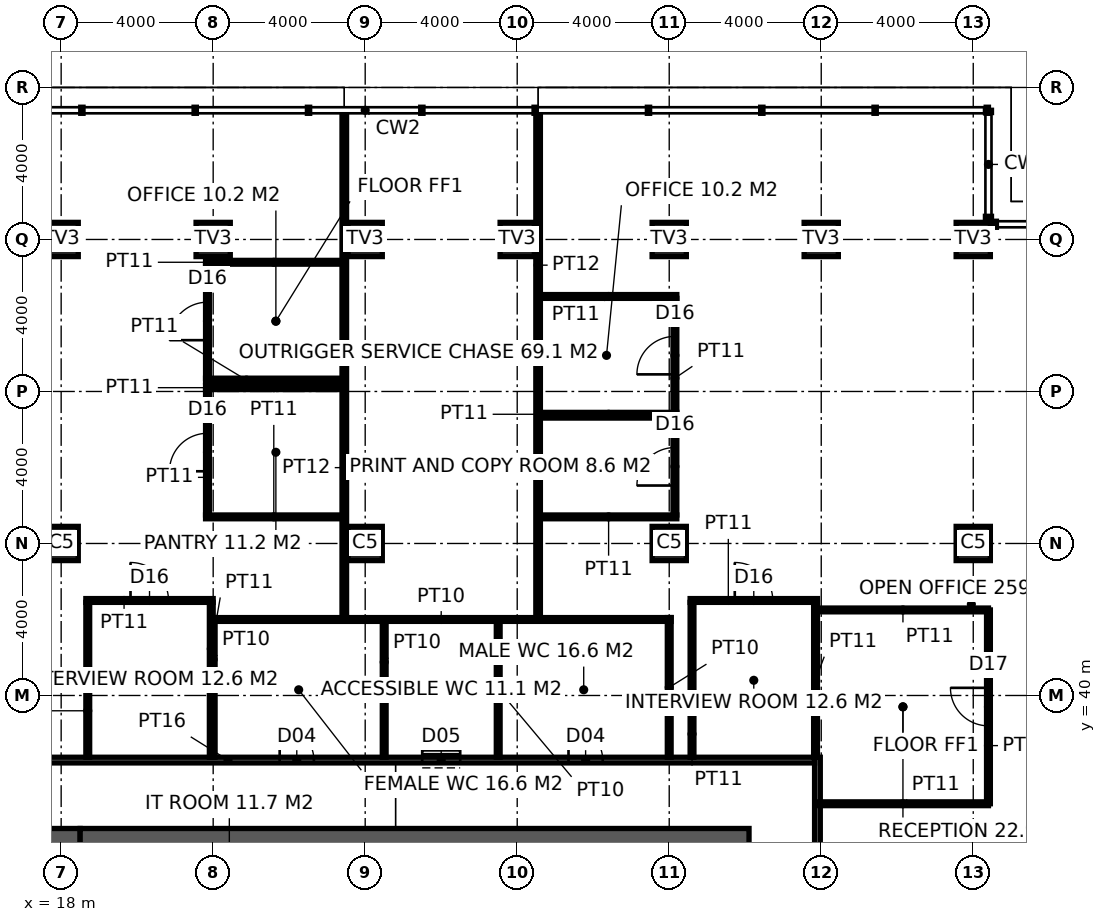
"""IFC4 building model, lengths in metres.
Left out: names, types, materials, properties, quantities, classifications, styles, units other than length and angle.
Written with IfcOpenShell. Run it as: python <this file> out.ifc"""

import sys

from ifc_helpers import new_model, si_unit, direction, frame, frame_2d, origin, origin_2d, place, context, subcontext, project, spatial, rectangle, hollow_rectangle, extrude, element, fill, save


model = new_model("IFC4")
c1 = context("Model", 3, precision=1e-05, world=origin(), true_north=direction((0.0, 1.0)))
c2 = subcontext(c1, "Body", "Model", "MODEL_VIEW")
j1 = project(units=[si_unit("LENGTHUNIT", "METRE"), si_unit("PLANEANGLEUNIT", "RADIAN")], contexts=[c1])
p1 = place(None, origin())
s1 = spatial("IfcSite", under=j1, at=p1, CompositionType="ELEMENT")
p2 = place(p1, origin())
s2 = spatial("IfcBuilding", under=s1, at=p2, CompositionType="ELEMENT")
p3 = place(p2, frame((0.0, 0.0, 171.8)))
s3 = spatial("IfcBuildingStorey", under=s2, at=p3, CompositionType="ELEMENT", Elevation=171.8)
for number, where, z_axis, x_axis in (
    (1, (18.0, 52.0, 0.0), (0.0, 0.0, 1.0), (1.0, 0.0, 0.0)),
    (2, (22.0, 52.0, 0.0), (0.0, 0.0, 1.0), (1.0, 0.0, 0.0)),
    (3, (26.0, 52.0, 0.0), (0.0, 0.0, 1.0), (1.0, 0.0, 0.0)),
    (4, (30.0, 52.0, 0.0), (0.0, 0.0, 1.0), (1.0, 0.0, 0.0)),
    (5, (34.0, 52.0, 0.0), (0.0, 0.0, 1.0), (1.0, 0.0, 0.0)),
    (6, (38.0, 52.0, 0.0), (0.0, 0.0, 1.0), (1.0, 0.0, 0.0)),
    (7, (42.0, 52.0, 0.0), (0.0, 0.0, 1.0), (1.0, 0.0, 0.0)),
):
    element("IfcColumn", number, at=place(p3, frame(where, z_axis=z_axis, x_axis=x_axis)), inside=s3, PredefinedType="USERDEFINED", context=c2, shape_type="SweptSolid", body=[
        extrude(hollow_rectangle(XDim=0.9, YDim=0.9, WallThickness=0.08, at=origin_2d()), origin(), (0.0, 0.0, 1.0), 4.0),
    ])
for number, where, z_axis, x_axis in (
    (8, (18.0, 44.0, 0.0), (0.0, 0.0, 1.0), (1.0, 0.0, 0.0)),
    (9, (26.0, 44.0, 0.0), (0.0, 0.0, 1.0), (1.0, 0.0, 0.0)),
    (10, (34.0, 44.0, 0.0), (0.0, 0.0, 1.0), (1.0, 0.0, 0.0)),
    (11, (42.0, 44.0, 0.0), (0.0, 0.0, 1.0), (1.0, 0.0, 0.0)),
):
    element("IfcColumn", number, at=place(p3, frame(where, z_axis=z_axis, x_axis=x_axis)), inside=s3, PredefinedType="COLUMN", context=c2, shape_type="SweptSolid", body=[
        extrude(hollow_rectangle(XDim=0.9, YDim=0.9, WallThickness=0.1, at=origin_2d()), origin(), (0.0, 0.0, 1.0), 4.0),
    ])
p4 = place(p3, frame((18.0, 17.5, -0.15), z_axis=(0.0, 0.0, 1.0), x_axis=(0.0, 1.0, 0.0)))
e12 = element("IfcWall", 12, at=p4, inside=s3, PredefinedType="SHEAR", context=c2, shape_type="SweptSolid", body=[
    extrude(rectangle(XDim=19.0, YDim=1.0, at=frame_2d((9.5, 0.0))), origin(), (0.0, 0.0, 1.0), 4.0),
])
p5 = place(p3, frame((18.5, 36.0, -0.15), z_axis=(0.0, 0.0, 1.0), x_axis=(1.0, 0.0, 0.0)))
e13 = element("IfcWall", 13, at=p5, inside=s3, PredefinedType="SHEAR", context=c2, shape_type="SweptSolid", body=[
    extrude(rectangle(XDim=17.6, YDim=1.0, at=frame_2d((8.8, 0.0))), origin(), (0.0, 0.0, 1.0), 4.0),
])
p6 = place(p3, frame((37.9, 15.625, 0.0), z_axis=(0.0, 0.0, 1.0), x_axis=(0.0, 1.0, 0.0)))
e14 = element("IfcWall", 14, at=p6, inside=s3, PredefinedType="PARTITIONING", context=c2, shape_type="SweptSolid", body=[
    extrude(rectangle(XDim=22.75, YDim=0.15, at=frame_2d((11.375, 0.0))), origin(), (0.0, 0.0, 1.0), 2.65),
])
p7 = place(p6, frame((3.074, 0.0, 0.0)))
e15 = element("IfcOpeningElement", 15, at=p7, cuts=e14, PredefinedType="OPENING", context=c2, shape_type="SweptSolid", body=[
    extrude(rectangle(XDim=1.8, YDim=2.4, at=frame_2d((0.9, 1.2))), frame((0.0, 0.085, 0.0), z_axis=(0.0, -1.0, 0.0), x_axis=(1.0, 0.0, 0.0)), (0.0, 0.0, 1.0), 0.17),
])
p8 = place(p6, frame((16.876, 0.0, 0.0)))
e16 = element("IfcOpeningElement", 16, at=p8, cuts=e14, PredefinedType="OPENING", context=c2, shape_type="SweptSolid", body=[
    extrude(rectangle(XDim=1.8, YDim=2.4, at=frame_2d((0.9, 1.2))), frame((0.0, 0.085, 0.0), z_axis=(0.0, -1.0, 0.0), x_axis=(1.0, 0.0, 0.0)), (0.0, 0.0, 1.0), 0.17),
])
p9 = place(p6, frame((9.875, 0.0, 0.0)))
e17 = element("IfcOpeningElement", 17, at=p9, cuts=e14, PredefinedType="OPENING", context=c2, shape_type="SweptSolid", body=[
    extrude(rectangle(XDim=1.0, YDim=2.2, at=frame_2d((0.5, 1.1))), frame((0.0, 0.085, 0.0), z_axis=(0.0, -1.0, 0.0), x_axis=(1.0, 0.0, 0.0)), (0.0, 0.0, 1.0), 0.17),
])
p10 = place(p3, frame((15.775, 38.3, 0.0), z_axis=(0.0, 0.0, 1.0), x_axis=(1.0, 0.0, 0.0)))
e18 = element("IfcWall", 18, at=p10, inside=s3, PredefinedType="PARTITIONING", context=c2, shape_type="SweptSolid", body=[
    extrude(rectangle(XDim=22.05, YDim=0.15, at=frame_2d((11.025, 0.0))), origin(), (0.0, 0.0, 1.0), 3.85),
])
p11 = place(p10, frame((7.975, 0.0, 0.0)))
e19 = element("IfcOpeningElement", 19, at=p11, cuts=e18, PredefinedType="OPENING", context=c2, shape_type="SweptSolid", body=[
    extrude(rectangle(XDim=0.9, YDim=2.1, at=frame_2d((0.45, 1.05))), frame((0.0, 0.085, 0.0), z_axis=(0.0, -1.0, 0.0), x_axis=(1.0, 0.0, 0.0)), (0.0, 0.0, 1.0), 0.17),
])
p12 = place(p10, frame((11.725, 0.0, 0.0)))
e20 = element("IfcOpeningElement", 20, at=p12, cuts=e18, PredefinedType="OPENING", context=c2, shape_type="SweptSolid", body=[
    extrude(rectangle(XDim=1.0, YDim=2.1, at=frame_2d((0.5, 1.05))), frame((0.0, 0.085, 0.0), z_axis=(0.0, -1.0, 0.0), x_axis=(1.0, 0.0, 0.0)), (0.0, 0.0, 1.0), 0.17),
])
p13 = place(p10, frame((15.575, 0.0, 0.0)))
e21 = element("IfcOpeningElement", 21, at=p13, cuts=e18, PredefinedType="OPENING", context=c2, shape_type="SweptSolid", body=[
    extrude(rectangle(XDim=0.9, YDim=2.1, at=frame_2d((0.45, 1.05))), frame((0.0, 0.085, 0.0), z_axis=(0.0, -1.0, 0.0), x_axis=(1.0, 0.0, 0.0)), (0.0, 0.0, 1.0), 0.17),
])
for number, where, z_axis, x_axis in (
    (22, (22.0, 38.375, 0.0), (0.0, 0.0, 1.0), (0.0, 1.0, 0.0)),
    (23, (34.0, 38.375, 0.0), (0.0, 0.0, 1.0), (0.0, 1.0, 0.0)),
):
    element("IfcWall", number, at=place(p3, frame(where, z_axis=z_axis, x_axis=x_axis)), inside=s3, PredefinedType="PARTITIONING", context=c2, shape_type="SweptSolid", body=[
        extrude(rectangle(XDim=3.675, YDim=0.1, at=frame_2d((1.837, 0.0))), origin(), (0.0, 0.0, 1.0), 2.95),
    ])
p14 = place(p3, frame((21.95, 42.0, 0.0), z_axis=(0.0, 0.0, 1.0), x_axis=(1.0, 0.0, 0.0)))
e24 = element("IfcWall", 24, at=p14, inside=s3, PredefinedType="PARTITIONING", context=c2, shape_type="SweptSolid", body=[
    extrude(rectangle(XDim=12.1, YDim=0.1, at=frame_2d((6.05, 0.0))), origin(), (0.0, 0.0, 1.0), 3.85),
])
for number, where, z_axis, x_axis in (
    (25, (26.5, 38.375, 0.0), (0.0, 0.0, 1.0), (0.0, 1.0, 0.0)),
    (26, (29.5, 38.375, 0.0), (0.0, 0.0, 1.0), (0.0, 1.0, 0.0)),
):
    element("IfcWall", number, at=place(p3, frame(where, z_axis=z_axis, x_axis=x_axis)), inside=s3, PredefinedType="PARTITIONING", context=c2, shape_type="SweptSolid", body=[
        extrude(rectangle(XDim=3.575, YDim=0.1, at=frame_2d((1.788, 0.0))), origin(), (0.0, 0.0, 1.0), 3.85),
    ])
for number, where, z_axis, x_axis in (
    (27, (25.45, 42.0, 0.0), (0.0, 0.0, 1.0), (0.0, 1.0, 0.0)),
    (28, (30.55, 42.0, 0.0), (0.0, 0.0, 1.0), (0.0, 1.0, 0.0)),
):
    element("IfcWall", number, at=place(p3, frame(where, z_axis=z_axis, x_axis=x_axis)), inside=s3, PredefinedType="PARTITIONING", context=c2, shape_type="SweptSolid", body=[
        extrude(rectangle(XDim=13.32, YDim=0.12, at=frame_2d((6.66, 0.0))), origin(), (0.0, 0.0, 1.0), 3.85),
    ])
p15 = place(p3, frame((18.65, 42.5, 0.0), z_axis=(0.0, 0.0, 1.0), x_axis=(1.0, 0.0, 0.0)))
e29 = element("IfcWall", 29, at=p15, inside=s3, PredefinedType="PARTITIONING", context=c2, shape_type="SweptSolid", body=[
    extrude(rectangle(XDim=3.35, YDim=0.1, at=frame_2d((1.675, 0.0))), origin(), (0.0, 0.0, 1.0), 3.85),
])
p16 = place(p15, frame((1.175, 0.0, 0.0)))
e30 = element("IfcOpeningElement", 30, at=p16, cuts=e29, PredefinedType="OPENING", context=c2, shape_type="SweptSolid", body=[
    extrude(rectangle(XDim=1.0, YDim=2.2, at=frame_2d((0.5, 1.1))), frame((0.0, 0.06, 0.0), z_axis=(0.0, -1.0, 0.0), x_axis=(1.0, 0.0, 0.0)), (0.0, 0.0, 1.0), 0.12),
])
p17 = place(p3, frame((34.55, 42.5, 0.0), z_axis=(0.0, 0.0, 1.0), x_axis=(1.0, 0.0, 0.0)))
e31 = element("IfcWall", 31, at=p17, inside=s3, PredefinedType="PARTITIONING", context=c2, shape_type="SweptSolid", body=[
    extrude(rectangle(XDim=3.35, YDim=0.1, at=frame_2d((1.675, 0.0))), origin(), (0.0, 0.0, 1.0), 3.85),
])
p18 = place(p17, frame((1.175, 0.0, 0.0)))
e32 = element("IfcOpeningElement", 32, at=p18, cuts=e31, PredefinedType="OPENING", context=c2, shape_type="SweptSolid", body=[
    extrude(rectangle(XDim=1.0, YDim=2.2, at=frame_2d((0.5, 1.1))), frame((0.0, 0.06, 0.0), z_axis=(0.0, -1.0, 0.0), x_axis=(1.0, 0.0, 0.0)), (0.0, 0.0, 1.0), 0.12),
])
for number, where, z_axis, x_axis in (
    (33, (21.8, 44.7, 0.0), (0.0, 0.0, 1.0), (1.0, 0.0, 0.0)),
    (34, (30.61, 44.7, 0.0), (0.0, 0.0, 1.0), (1.0, 0.0, 0.0)),
    (35, (30.61, 47.35, 0.0), (0.0, 0.0, 1.0), (1.0, 0.0, 0.0)),
    (36, (30.61, 47.4, 0.0), (0.0, 0.0, 1.0), (1.0, 0.0, 0.0)),
    (37, (21.8, 48.1, 0.0), (0.0, 0.0, 1.0), (1.0, 0.0, 0.0)),
    (38, (21.8, 48.3, 0.0), (0.0, 0.0, 1.0), (1.0, 0.0, 0.0)),
    (39, (30.61, 50.5, 0.0), (0.0, 0.0, 1.0), (1.0, 0.0, 0.0)),
    (40, (21.8, 51.4, 0.0), (0.0, 0.0, 1.0), (1.0, 0.0, 0.0)),
):
    element("IfcWall", number, at=place(p3, frame(where, z_axis=z_axis, x_axis=x_axis)), inside=s3, PredefinedType="PARTITIONING", context=c2, shape_type="SweptSolid", body=[
        extrude(rectangle(XDim=3.59, YDim=0.1, at=frame_2d((1.795, 0.0))), origin(), (0.0, 0.0, 1.0), 3.85),
    ])
p19 = place(p3, frame((18.7, 38.375, 0.0), z_axis=(0.0, 0.0, 1.0), x_axis=(0.0, 1.0, 0.0)))
e41 = element("IfcWall", 41, at=p19, inside=s3, PredefinedType="PARTITIONING", context=c2, shape_type="SweptSolid", body=[
    extrude(rectangle(XDim=4.075, YDim=0.1, at=frame_2d((2.038, 0.0))), origin(), (0.0, 0.0, 1.0), 3.85),
])
p20 = place(p3, frame((21.85, 44.75, 0.0), z_axis=(0.0, 0.0, 1.0), x_axis=(0.0, 1.0, 0.0)))
e42 = element("IfcWall", 42, at=p20, inside=s3, PredefinedType="PARTITIONING", context=c2, shape_type="SweptSolid", body=[
    extrude(rectangle(XDim=3.3, YDim=0.1, at=frame_2d((1.65, 0.0))), origin(), (0.0, 0.0, 1.0), 2.95),
])
p21 = place(p20, frame((1.15, 0.0, 0.0)))
e43 = element("IfcOpeningElement", 43, at=p21, cuts=e42, PredefinedType="OPENING", context=c2, shape_type="SweptSolid", body=[
    extrude(rectangle(XDim=1.0, YDim=2.2, at=frame_2d((0.5, 1.1))), frame((0.0, 0.06, 0.0), z_axis=(0.0, -1.0, 0.0), x_axis=(1.0, 0.0, 0.0)), (0.0, 0.0, 1.0), 0.12),
])
p22 = place(p3, frame((21.85, 48.35, 0.0), z_axis=(0.0, 0.0, 1.0), x_axis=(0.0, 1.0, 0.0)))
e44 = element("IfcWall", 44, at=p22, inside=s3, PredefinedType="PARTITIONING", context=c2, shape_type="SweptSolid", body=[
    extrude(rectangle(XDim=3.0, YDim=0.1, at=frame_2d((1.5, 0.0))), origin(), (0.0, 0.0, 1.0), 2.95),
])
p23 = place(p22, frame((1.0, 0.0, 0.0)))
e45 = element("IfcOpeningElement", 45, at=p23, cuts=e44, PredefinedType="OPENING", context=c2, shape_type="SweptSolid", body=[
    extrude(rectangle(XDim=1.0, YDim=2.2, at=frame_2d((0.5, 1.1))), frame((0.0, 0.06, 0.0), z_axis=(0.0, -1.0, 0.0), x_axis=(1.0, 0.0, 0.0)), (0.0, 0.0, 1.0), 0.12),
])
p24 = place(p3, frame((21.95, 38.375, 0.0), z_axis=(0.0, 0.0, 1.0), x_axis=(0.0, 1.0, 0.0)))
e46 = element("IfcWall", 46, at=p24, inside=s3, PredefinedType="PARTITIONING", context=c2, shape_type="SweptSolid", body=[
    extrude(rectangle(XDim=4.075, YDim=0.1, at=frame_2d((2.038, 0.0))), origin(), (0.0, 0.0, 1.0), 2.95),
])
p25 = place(p3, frame((34.15, 44.75, 0.0), z_axis=(0.0, 0.0, 1.0), x_axis=(0.0, 1.0, 0.0)))
e47 = element("IfcWall", 47, at=p25, inside=s3, PredefinedType="PARTITIONING", context=c2, shape_type="SweptSolid", body=[
    extrude(rectangle(XDim=2.55, YDim=0.1, at=frame_2d((1.275, 0.0))), origin(), (0.0, 0.0, 1.0), 2.95),
])
p26 = place(p25, frame((0.775, 0.0, 0.0)))
e48 = element("IfcOpeningElement", 48, at=p26, cuts=e47, PredefinedType="OPENING", context=c2, shape_type="SweptSolid", body=[
    extrude(rectangle(XDim=1.0, YDim=2.2, at=frame_2d((0.5, 1.1))), frame((0.0, 0.06, 0.0), z_axis=(0.0, -1.0, 0.0), x_axis=(1.0, 0.0, 0.0)), (0.0, 0.0, 1.0), 0.12),
])
p27 = place(p3, frame((34.15, 47.45, 0.0), z_axis=(0.0, 0.0, 1.0), x_axis=(0.0, 1.0, 0.0)))
e49 = element("IfcWall", 49, at=p27, inside=s3, PredefinedType="PARTITIONING", context=c2, shape_type="SweptSolid", body=[
    extrude(rectangle(XDim=3.0, YDim=0.1, at=frame_2d((1.5, 0.0))), origin(), (0.0, 0.0, 1.0), 2.95),
])
p28 = place(p27, frame((1.0, 0.0, 0.0)))
e50 = element("IfcOpeningElement", 50, at=p28, cuts=e49, PredefinedType="OPENING", context=c2, shape_type="SweptSolid", body=[
    extrude(rectangle(XDim=1.0, YDim=2.2, at=frame_2d((0.5, 1.1))), frame((0.0, 0.06, 0.0), z_axis=(0.0, -1.0, 0.0), x_axis=(1.0, 0.0, 0.0)), (0.0, 0.0, 1.0), 0.12),
])
p29 = place(p3, frame((34.6, 38.375, 0.0), z_axis=(0.0, 0.0, 1.0), x_axis=(0.0, 1.0, 0.0)))
e51 = element("IfcWall", 51, at=p29, inside=s3, PredefinedType="PARTITIONING", context=c2, shape_type="SweptSolid", body=[
    extrude(rectangle(XDim=4.075, YDim=0.1, at=frame_2d((2.038, 0.0))), origin(), (0.0, 0.0, 1.0), 3.85),
])
p30 = place(p3, frame((37.85, 38.375, 0.0), z_axis=(0.0, 0.0, 1.0), x_axis=(0.0, 1.0, 0.0)))
e52 = element("IfcWall", 52, at=p30, inside=s3, PredefinedType="PARTITIONING", context=c2, shape_type="SweptSolid", body=[
    extrude(rectangle(XDim=4.075, YDim=0.1, at=frame_2d((2.038, 0.0))), origin(), (0.0, 0.0, 1.0), 2.65),
])
p31 = place(p3, frame((37.9, 37.151, 0.0), z_axis=(0.0, 0.0, 1.0), x_axis=(1.0, 0.0, 0.0)))
e53 = element("IfcWall", 53, at=p31, inside=s3, PredefinedType="PARTITIONING", context=c2, shape_type="SweptSolid", body=[
    extrude(rectangle(XDim=4.5, YDim=0.1, at=frame_2d((2.25, 0.0))), origin(), (0.0, 0.0, 1.0), 3.85),
])
p32 = place(p3, frame((42.4, 37.151, 0.0), z_axis=(0.0, 0.0, 1.0), x_axis=(0.0, 1.0, 0.0)))
e54 = element("IfcWall", 54, at=p32, inside=s3, PredefinedType="PARTITIONING", context=c2, shape_type="SweptSolid", body=[
    extrude(rectangle(XDim=5.1, YDim=0.1, at=frame_2d((2.55, 0.0))), origin(), (0.0, 0.0, 1.0), 2.65),
])
p33 = place(p32, frame((2.05, 0.0, 0.0)))
e55 = element("IfcOpeningElement", 55, at=p33, cuts=e54, PredefinedType="OPENING", context=c2, shape_type="SweptSolid", body=[
    extrude(rectangle(XDim=1.0, YDim=2.2, at=frame_2d((0.5, 1.1))), frame((0.0, 0.06, 0.0), z_axis=(0.0, -1.0, 0.0), x_axis=(1.0, 0.0, 0.0)), (0.0, 0.0, 1.0), 0.12),
])
p34 = place(p3, frame((42.4, 42.251, 0.0), z_axis=(0.0, 0.0, 1.0), x_axis=(-1.0, 0.0, 0.0)))
e56 = element("IfcWall", 56, at=p34, inside=s3, PredefinedType="PARTITIONING", context=c2, shape_type="SweptSolid", body=[
    extrude(rectangle(XDim=4.5, YDim=0.1, at=frame_2d((2.25, 0.0))), origin(), (0.0, 0.0, 1.0), 3.85),
])
p35 = place(p11, origin())
e57 = element("IfcDoor", 57, at=p35, inside=s3, OperationType="SINGLE_SWING_LEFT", PredefinedType="DOOR", context=c2, shape_type="SweptSolid", body=[
    extrude(rectangle(XDim=0.9, YDim=2.1, at=frame_2d((0.45, 1.05))), frame((0.0, 0.025, 0.0), z_axis=(0.0, -1.0, 0.0), x_axis=(1.0, 0.0, 0.0)), (0.0, 0.0, 1.0), 0.05),
])
fill(e19, e57)
p36 = place(p12, origin())
e58 = element("IfcDoor", 58, at=p36, inside=s3, OperationType="SLIDING_TO_LEFT", PredefinedType="DOOR", context=c2, shape_type="SweptSolid", body=[
    extrude(rectangle(XDim=1.0, YDim=2.1, at=frame_2d((0.5, 1.05))), frame((0.0, 0.025, 0.0), z_axis=(0.0, -1.0, 0.0), x_axis=(1.0, 0.0, 0.0)), (0.0, 0.0, 1.0), 0.05),
])
fill(e20, e58)
p37 = place(p13, origin())
e59 = element("IfcDoor", 59, at=p37, inside=s3, OperationType="SINGLE_SWING_LEFT", PredefinedType="DOOR", context=c2, shape_type="SweptSolid", body=[
    extrude(rectangle(XDim=0.9, YDim=2.1, at=frame_2d((0.45, 1.05))), frame((0.0, 0.025, 0.0), z_axis=(0.0, -1.0, 0.0), x_axis=(1.0, 0.0, 0.0)), (0.0, 0.0, 1.0), 0.05),
])
fill(e21, e59)
p38 = place(p16, origin())
e60 = element("IfcDoor", 60, at=p38, inside=s3, OperationType="SINGLE_SWING_LEFT", PredefinedType="DOOR", context=c2, shape_type="SweptSolid", body=[
    extrude(rectangle(XDim=1.0, YDim=2.2, at=frame_2d((0.5, 1.1))), frame((0.0, 0.025, 0.0), z_axis=(0.0, -1.0, 0.0), x_axis=(1.0, 0.0, 0.0)), (0.0, 0.0, 1.0), 0.05),
])
fill(e30, e60)
p39 = place(p21, origin())
e61 = element("IfcDoor", 61, at=p39, inside=s3, OperationType="SINGLE_SWING_LEFT", PredefinedType="DOOR", context=c2, shape_type="SweptSolid", body=[
    extrude(rectangle(XDim=1.0, YDim=2.2, at=frame_2d((0.5, 1.1))), frame((0.0, 0.025, 0.0), z_axis=(0.0, -1.0, 0.0), x_axis=(1.0, 0.0, 0.0)), (0.0, 0.0, 1.0), 0.05),
])
fill(e43, e61)
p40 = place(p23, origin())
e62 = element("IfcDoor", 62, at=p40, inside=s3, OperationType="SINGLE_SWING_LEFT", PredefinedType="DOOR", context=c2, shape_type="SweptSolid", body=[
    extrude(rectangle(XDim=1.0, YDim=2.2, at=frame_2d((0.5, 1.1))), frame((0.0, 0.025, 0.0), z_axis=(0.0, -1.0, 0.0), x_axis=(1.0, 0.0, 0.0)), (0.0, 0.0, 1.0), 0.05),
])
fill(e45, e62)
p41 = place(p18, origin())
e63 = element("IfcDoor", 63, at=p41, inside=s3, OperationType="SINGLE_SWING_LEFT", PredefinedType="DOOR", context=c2, shape_type="SweptSolid", body=[
    extrude(rectangle(XDim=1.0, YDim=2.2, at=frame_2d((0.5, 1.1))), frame((0.0, 0.025, 0.0), z_axis=(0.0, -1.0, 0.0), x_axis=(1.0, 0.0, 0.0)), (0.0, 0.0, 1.0), 0.05),
])
fill(e32, e63)
p42 = place(p26, origin())
e64 = element("IfcDoor", 64, at=p42, inside=s3, OperationType="SINGLE_SWING_LEFT", PredefinedType="DOOR", context=c2, shape_type="SweptSolid", body=[
    extrude(rectangle(XDim=1.0, YDim=2.2, at=frame_2d((0.5, 1.1))), frame((0.0, 0.025, 0.0), z_axis=(0.0, -1.0, 0.0), x_axis=(1.0, 0.0, 0.0)), (0.0, 0.0, 1.0), 0.05),
])
fill(e48, e64)
p43 = place(p28, origin())
e65 = element("IfcDoor", 65, at=p43, inside=s3, OperationType="SINGLE_SWING_LEFT", PredefinedType="DOOR", context=c2, shape_type="SweptSolid", body=[
    extrude(rectangle(XDim=1.0, YDim=2.2, at=frame_2d((0.5, 1.1))), frame((0.0, 0.025, 0.0), z_axis=(0.0, -1.0, 0.0), x_axis=(1.0, 0.0, 0.0)), (0.0, 0.0, 1.0), 0.05),
])
fill(e50, e65)
p44 = place(p33, origin())
e66 = element("IfcDoor", 66, at=p44, inside=s3, OperationType="SINGLE_SWING_RIGHT", PredefinedType="DOOR", context=c2, shape_type="SweptSolid", body=[
    extrude(rectangle(XDim=1.0, YDim=2.2, at=frame_2d((0.5, 1.1))), frame((0.0, 0.025, 0.0), z_axis=(0.0, -1.0, 0.0), x_axis=(1.0, 0.0, 0.0)), (0.0, 0.0, 1.0), 0.05),
])
fill(e55, e66)
save(model, sys.argv[1])
